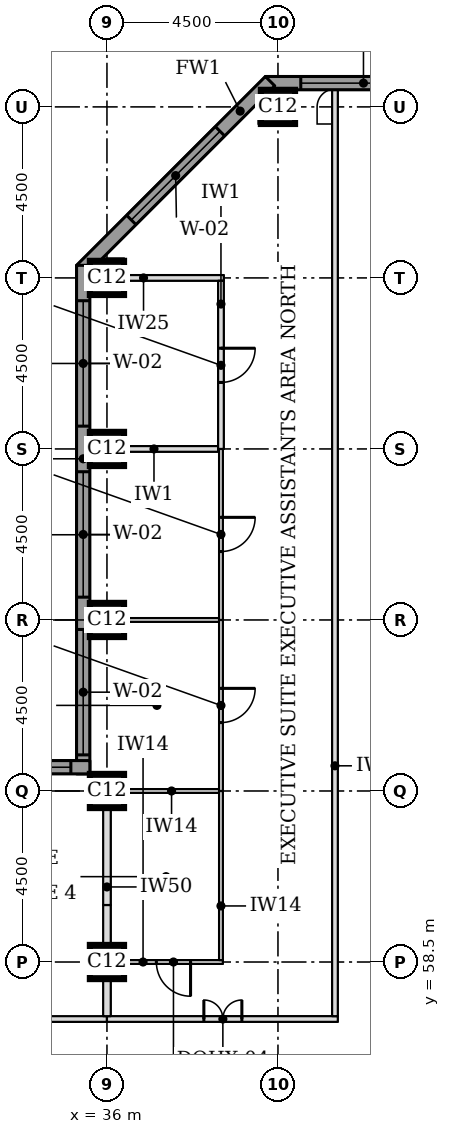
"""IFC4 building model, lengths in metres.
Left out: names, types, materials, properties, quantities, classifications, styles, units other than length and angle.
Written with IfcOpenShell. Run it as: python <this file> out.ifc"""

import sys

from ifc_helpers import new_model, si_unit, direction, frame, frame_2d, origin, origin_2d, place, context, subcontext, project, spatial, rectangle, extrude, element, fill, save


model = new_model("IFC4")
c1 = context("Model", 3, precision=1e-05, world=origin(), true_north=direction((0.0, 1.0)))
c2 = subcontext(c1, "Body", "Model", "MODEL_VIEW")
j1 = project(units=[si_unit("LENGTHUNIT", "METRE"), si_unit("PLANEANGLEUNIT", "RADIAN")], contexts=[c1])
p1 = place(None, origin())
s1 = spatial("IfcSite", under=j1, at=p1, CompositionType="ELEMENT")
p2 = place(p1, origin())
s2 = spatial("IfcBuilding", under=s1, at=p2, CompositionType="ELEMENT")
p3 = place(p2, frame((0.0, 0.0, 256.3)))
s3 = spatial("IfcBuildingStorey", under=s2, at=p3, CompositionType="ELEMENT", Elevation=256.3)
for number, where, z_axis, x_axis in (
    (1, (36.0, 58.5, 0.0), (0.0, 0.0, 1.0), (1.0, 0.0, 0.0)),
    (2, (36.0, 63.0, 0.0), (0.0, 0.0, 1.0), (1.0, 0.0, 0.0)),
    (3, (36.0, 67.5, 0.0), (0.0, 0.0, 1.0), (1.0, 0.0, 0.0)),
    (4, (36.0, 72.0, 0.0), (0.0, 0.0, 1.0), (1.0, 0.0, 0.0)),
    (5, (36.0, 76.5, 0.0), (0.0, 0.0, 1.0), (1.0, 0.0, 0.0)),
    (6, (40.5, 81.0, 0.0), (0.0, 0.0, 1.0), (1.0, 0.0, 0.0)),
):
    element("IfcColumn", number, at=place(p3, frame(where, z_axis=z_axis, x_axis=x_axis)), inside=s3, PredefinedType="COLUMN", context=c2, shape_type="SweptSolid", body=[
        extrude(rectangle(XDim=0.9, YDim=0.9, at=origin_2d()), origin(), (0.0, 0.0, 1.0), 3.7),
    ])
p4 = place(p3, frame((72.331, 81.625, 0.0), z_axis=(0.0, 0.0, 1.0), x_axis=(-1.0, 0.0, 0.0)))
e7 = element("IfcWall", 7, at=p4, inside=s3, PredefinedType="STANDARD", context=c2, shape_type="SweptSolid", body=[
    extrude(rectangle(XDim=32.163, YDim=0.35, at=frame_2d((16.081, 0.0))), origin(), (0.0, 0.0, 1.0), 3.525),
])
p5 = place(p4, frame((0.931, 0.0, 0.9)))
e8 = element("IfcOpeningElement", 8, at=p5, cuts=e7, PredefinedType="OPENING", context=c2, shape_type="SweptSolid", body=[
    extrude(rectangle(XDim=3.3, YDim=1.9, at=frame_2d((1.65, 0.95))), frame((0.0, 0.185, 0.0), z_axis=(0.0, -1.0, 0.0), x_axis=(1.0, 0.0, 0.0)), (0.0, 0.0, 1.0), 0.37),
])
p6 = place(p4, frame((5.431, 0.0, 0.9)))
e9 = element("IfcOpeningElement", 9, at=p6, cuts=e7, PredefinedType="OPENING", context=c2, shape_type="SweptSolid", body=[
    extrude(rectangle(XDim=3.3, YDim=1.9, at=frame_2d((1.65, 0.95))), frame((0.0, 0.185, 0.0), z_axis=(0.0, -1.0, 0.0), x_axis=(1.0, 0.0, 0.0)), (0.0, 0.0, 1.0), 0.37),
])
p7 = place(p4, frame((9.931, 0.0, 0.9)))
e10 = element("IfcOpeningElement", 10, at=p7, cuts=e7, PredefinedType="OPENING", context=c2, shape_type="SweptSolid", body=[
    extrude(rectangle(XDim=3.3, YDim=1.9, at=frame_2d((1.65, 0.95))), frame((0.0, 0.185, 0.0), z_axis=(0.0, -1.0, 0.0), x_axis=(1.0, 0.0, 0.0)), (0.0, 0.0, 1.0), 0.37),
])
p8 = place(p4, frame((14.431, 0.0, 0.9)))
e11 = element("IfcOpeningElement", 11, at=p8, cuts=e7, PredefinedType="OPENING", context=c2, shape_type="SweptSolid", body=[
    extrude(rectangle(XDim=3.3, YDim=1.9, at=frame_2d((1.65, 0.95))), frame((0.0, 0.185, 0.0), z_axis=(0.0, -1.0, 0.0), x_axis=(1.0, 0.0, 0.0)), (0.0, 0.0, 1.0), 0.37),
])
p9 = place(p4, frame((18.931, 0.0, 0.9)))
e12 = element("IfcOpeningElement", 12, at=p9, cuts=e7, PredefinedType="OPENING", context=c2, shape_type="SweptSolid", body=[
    extrude(rectangle(XDim=3.3, YDim=1.9, at=frame_2d((1.65, 0.95))), frame((0.0, 0.185, 0.0), z_axis=(0.0, -1.0, 0.0), x_axis=(1.0, 0.0, 0.0)), (0.0, 0.0, 1.0), 0.37),
])
p10 = place(p4, frame((23.431, 0.0, 0.9)))
e13 = element("IfcOpeningElement", 13, at=p10, cuts=e7, PredefinedType="OPENING", context=c2, shape_type="SweptSolid", body=[
    extrude(rectangle(XDim=3.3, YDim=1.9, at=frame_2d((1.65, 0.95))), frame((0.0, 0.185, 0.0), z_axis=(0.0, -1.0, 0.0), x_axis=(1.0, 0.0, 0.0)), (0.0, 0.0, 1.0), 0.37),
])
p11 = place(p4, frame((27.931, 0.0, 0.9)))
e14 = element("IfcOpeningElement", 14, at=p11, cuts=e7, PredefinedType="OPENING", context=c2, shape_type="SweptSolid", body=[
    extrude(rectangle(XDim=3.3, YDim=1.9, at=frame_2d((1.65, 0.95))), frame((0.0, 0.185, 0.0), z_axis=(0.0, -1.0, 0.0), x_axis=(1.0, 0.0, 0.0)), (0.0, 0.0, 1.0), 0.37),
])
p12 = place(p3, frame((40.292, 81.676, 0.0), z_axis=(0.0, 0.0, 1.0), x_axis=(-0.707106781187, -0.707106781187, 0.0)))
e15 = element("IfcWall", 15, at=p12, inside=s3, PredefinedType="STANDARD", context=c2, shape_type="SweptSolid", body=[
    extrude(rectangle(XDim=7.027, YDim=0.35, at=frame_2d((3.513, 0.0))), origin(), (0.0, 0.0, 1.0), 3.525),
])
p13 = place(p12, frame((1.863, 0.0, 0.9)))
e16 = element("IfcOpeningElement", 16, at=p13, cuts=e15, PredefinedType="OPENING", context=c2, shape_type="SweptSolid", body=[
    extrude(rectangle(XDim=3.3, YDim=1.9, at=frame_2d((1.65, 0.95))), frame((0.0, 0.185, 0.0), z_axis=(0.0, -1.0, 0.0), x_axis=(1.0, 0.0, 0.0)), (0.0, 0.0, 1.0), 0.37),
])
p14 = place(p3, frame((35.375, 76.831, 0.0), z_axis=(0.0, 0.0, 1.0), x_axis=(0.0, -1.0, 0.0)))
e17 = element("IfcWall", 17, at=p14, inside=s3, PredefinedType="STANDARD", context=c2, shape_type="SweptSolid", body=[
    extrude(rectangle(XDim=13.381, YDim=0.35, at=frame_2d((6.691, 0.0))), origin(), (0.0, 0.0, 1.0), 3.525),
])
p15 = place(p14, frame((0.931, 0.0, 0.9)))
e18 = element("IfcOpeningElement", 18, at=p15, cuts=e17, PredefinedType="OPENING", context=c2, shape_type="SweptSolid", body=[
    extrude(rectangle(XDim=3.3, YDim=1.9, at=frame_2d((1.65, 0.95))), frame((0.0, 0.185, 0.0), z_axis=(0.0, -1.0, 0.0), x_axis=(1.0, 0.0, 0.0)), (0.0, 0.0, 1.0), 0.37),
])
p16 = place(p14, frame((5.431, 0.0, 0.9)))
e19 = element("IfcOpeningElement", 19, at=p16, cuts=e17, PredefinedType="OPENING", context=c2, shape_type="SweptSolid", body=[
    extrude(rectangle(XDim=3.3, YDim=1.9, at=frame_2d((1.65, 0.95))), frame((0.0, 0.185, 0.0), z_axis=(0.0, -1.0, 0.0), x_axis=(1.0, 0.0, 0.0)), (0.0, 0.0, 1.0), 0.37),
])
p17 = place(p14, frame((9.581, 0.0, 0.9)))
e20 = element("IfcOpeningElement", 20, at=p17, cuts=e17, PredefinedType="OPENING", context=c2, shape_type="SweptSolid", body=[
    extrude(rectangle(XDim=3.3, YDim=1.9, at=frame_2d((1.65, 0.95))), frame((0.0, 0.185, 0.0), z_axis=(0.0, -1.0, 0.0), x_axis=(1.0, 0.0, 0.0)), (0.0, 0.0, 1.0), 0.37),
])
p18 = place(p3, frame((35.55, 63.625, 0.0), z_axis=(0.0, 0.0, 1.0), x_axis=(-1.0, 0.0, 0.0)))
e21 = element("IfcWall", 21, at=p18, inside=s3, PredefinedType="STANDARD", context=c2, shape_type="SweptSolid", body=[
    extrude(rectangle(XDim=17.881, YDim=0.35, at=frame_2d((8.941, 0.0))), origin(), (0.0, 0.0, 1.0), 3.525),
])
p19 = place(p18, frame((0.5, 0.0, 0.9)))
e22 = element("IfcOpeningElement", 22, at=p19, cuts=e21, PredefinedType="OPENING", context=c2, shape_type="SweptSolid", body=[
    extrude(rectangle(XDim=3.3, YDim=1.9, at=frame_2d((1.65, 0.95))), frame((0.0, 0.185, 0.0), z_axis=(0.0, -1.0, 0.0), x_axis=(1.0, 0.0, 0.0)), (0.0, 0.0, 1.0), 0.37),
])
p20 = place(p18, frame((4.65, 0.0, 0.9)))
e23 = element("IfcOpeningElement", 23, at=p20, cuts=e21, PredefinedType="OPENING", context=c2, shape_type="SweptSolid", body=[
    extrude(rectangle(XDim=3.3, YDim=1.9, at=frame_2d((1.65, 0.95))), frame((0.0, 0.185, 0.0), z_axis=(0.0, -1.0, 0.0), x_axis=(1.0, 0.0, 0.0)), (0.0, 0.0, 1.0), 0.37),
])
p21 = place(p18, frame((9.15, 0.0, 0.9)))
e24 = element("IfcOpeningElement", 24, at=p21, cuts=e21, PredefinedType="OPENING", context=c2, shape_type="SweptSolid", body=[
    extrude(rectangle(XDim=3.3, YDim=1.9, at=frame_2d((1.65, 0.95))), frame((0.0, 0.185, 0.0), z_axis=(0.0, -1.0, 0.0), x_axis=(1.0, 0.0, 0.0)), (0.0, 0.0, 1.0), 0.37),
])
p22 = place(p18, frame((13.65, 0.0, 0.9)))
e25 = element("IfcOpeningElement", 25, at=p22, cuts=e21, PredefinedType="OPENING", context=c2, shape_type="SweptSolid", body=[
    extrude(rectangle(XDim=3.3, YDim=1.9, at=frame_2d((1.65, 0.95))), frame((0.0, 0.185, 0.0), z_axis=(0.0, -1.0, 0.0), x_axis=(1.0, 0.0, 0.0)), (0.0, 0.0, 1.0), 0.37),
])
p23 = place(p3, frame((29.38, 57.0, 0.0), z_axis=(0.0, 0.0, 1.0), x_axis=(1.0, 0.0, 0.0)))
e26 = element("IfcWall", 26, at=p23, inside=s3, PredefinedType="PARTITIONING", context=c2, shape_type="SweptSolid", body=[
    extrude(rectangle(XDim=6.62, YDim=0.15, at=frame_2d((3.31, 0.0))), origin(), (0.0, 0.0, 1.0), 3.55),
])
p24 = place(p23, frame((2.88, 0.0, 0.0)))
e27 = element("IfcOpeningElement", 27, at=p24, cuts=e26, PredefinedType="OPENING", context=c2, shape_type="SweptSolid", body=[
    extrude(rectangle(XDim=1.0, YDim=2.1, at=frame_2d((0.5, 1.05))), frame((0.0, 0.085, 0.0), z_axis=(0.0, -1.0, 0.0), x_axis=(1.0, 0.0, 0.0)), (0.0, 0.0, 1.0), 0.17),
])
p25 = place(p3, frame((36.0, 57.0, 0.0), z_axis=(0.0, 0.0, 1.0), x_axis=(1.0, 0.0, 0.0)))
e28 = element("IfcWall", 28, at=p25, inside=s3, PredefinedType="PARTITIONING", context=c2, shape_type="SweptSolid", body=[
    extrude(rectangle(XDim=6.075, YDim=0.15, at=frame_2d((3.038, 0.0))), origin(), (0.0, 0.0, 1.0), 3.55),
])
p26 = place(p25, frame((2.55, 0.0, 0.0)))
e29 = element("IfcOpeningElement", 29, at=p26, cuts=e28, PredefinedType="OPENING", context=c2, shape_type="SweptSolid", body=[
    extrude(rectangle(XDim=1.0, YDim=2.1, at=frame_2d((0.5, 1.05))), frame((0.0, 0.085, 0.0), z_axis=(0.0, -1.0, 0.0), x_axis=(1.0, 0.0, 0.0)), (0.0, 0.0, 1.0), 0.17),
])
p27 = place(p3, frame((36.45, 58.5, 0.0), z_axis=(0.0, 0.0, 1.0), x_axis=(1.0, 0.0, 0.0)))
e30 = element("IfcWall", 30, at=p27, inside=s3, PredefinedType="PARTITIONING", context=c2, shape_type="SweptSolid", body=[
    extrude(rectangle(XDim=2.6, YDim=0.1, at=frame_2d((1.3, 0.0))), origin(), (0.0, 0.0, 1.0), 3.55),
])
p28 = place(p27, frame((0.85, 0.0, 0.0)))
e31 = element("IfcOpeningElement", 31, at=p28, cuts=e30, PredefinedType="OPENING", context=c2, shape_type="SweptSolid", body=[
    extrude(rectangle(XDim=0.9, YDim=2.1, at=frame_2d((0.45, 1.05))), frame((0.0, 0.06, 0.0), z_axis=(0.0, -1.0, 0.0), x_axis=(1.0, 0.0, 0.0)), (0.0, 0.0, 1.0), 0.12),
])
p29 = place(p3, frame((36.45, 63.0, 0.0), z_axis=(0.0, 0.0, 1.0), x_axis=(1.0, 0.0, 0.0)))
e32 = element("IfcWall", 32, at=p29, inside=s3, PredefinedType="PARTITIONING", context=c2, shape_type="SweptSolid", body=[
    extrude(rectangle(XDim=2.5, YDim=0.1, at=frame_2d((1.25, 0.0))), origin(), (0.0, 0.0, 1.0), 3.55),
])
p30 = place(p3, frame((35.55, 67.5, 0.0), z_axis=(0.0, 0.0, 1.0), x_axis=(1.0, 0.0, 0.0)))
e33 = element("IfcWall", 33, at=p30, inside=s3, PredefinedType="PARTITIONING", context=c2, shape_type="SweptSolid", body=[
    extrude(rectangle(XDim=3.4, YDim=0.1, at=frame_2d((1.7, 0.0))), origin(), (0.0, 0.0, 1.0), 3.55),
])
p31 = place(p3, frame((35.55, 72.0, 0.0), z_axis=(0.0, 0.0, 1.0), x_axis=(1.0, 0.0, 0.0)))
e34 = element("IfcWall", 34, at=p31, inside=s3, PredefinedType="PARTITIONING", context=c2, shape_type="SweptSolid", body=[
    extrude(rectangle(XDim=3.375, YDim=0.15, at=frame_2d((1.688, 0.0))), origin(), (0.0, 0.0, 1.0), 3.55),
])
p32 = place(p3, frame((36.45, 76.5, 0.0), z_axis=(0.0, 0.0, 1.0), x_axis=(1.0, 0.0, 0.0)))
e35 = element("IfcWall", 35, at=p32, inside=s3, PredefinedType="PARTITIONING", context=c2, shape_type="SweptSolid", body=[
    extrude(rectangle(XDim=2.625, YDim=0.15, at=frame_2d((1.312, 0.0))), origin(), (0.0, 0.0, 1.0), 3.096),
])
p33 = place(p3, frame((36.0, 57.075, 0.0), z_axis=(0.0, 0.0, 1.0), x_axis=(0.0, 1.0, 0.0)))
e36 = element("IfcWall", 36, at=p33, inside=s3, PredefinedType="PARTITIONING", context=c2, shape_type="SweptSolid", body=[
    extrude(rectangle(XDim=0.975, YDim=0.2, at=frame_2d((0.488, 0.0))), origin(), (0.0, 0.0, 1.0), 2.8),
])
p34 = place(p3, frame((42.0, 57.075, 0.0), z_axis=(0.0, 0.0, 1.0), x_axis=(0.0, 1.0, 0.0)))
e37 = element("IfcWall", 37, at=p34, inside=s3, PredefinedType="PARTITIONING", context=c2, shape_type="SweptSolid", body=[
    extrude(rectangle(XDim=24.375, YDim=0.15, at=frame_2d((12.188, 0.0))), origin(), (0.0, 0.0, 1.0), 3.55),
])
p35 = place(p3, frame((39.0, 58.55, 0.0), z_axis=(0.0, 0.0, 1.0), x_axis=(0.0, 1.0, 0.0)))
e38 = element("IfcWall", 38, at=p35, inside=s3, PredefinedType="PARTITIONING", context=c2, shape_type="SweptSolid", body=[
    extrude(rectangle(XDim=4.45, YDim=0.1, at=frame_2d((2.225, 0.0))), origin(), (0.0, 0.0, 1.0), 3.55),
])
p36 = place(p3, frame((36.0, 58.92, 0.0), z_axis=(0.0, 0.0, 1.0), x_axis=(0.0, 1.0, 0.0)))
e39 = element("IfcWall", 39, at=p36, inside=s3, PredefinedType="PARTITIONING", context=c2, shape_type="SweptSolid", body=[
    extrude(rectangle(XDim=1.08, YDim=0.2, at=frame_2d((0.54, 0.0))), origin(), (0.0, 0.0, 1.0), 2.8),
])
p37 = place(p3, frame((36.0, 60.0, 0.0), z_axis=(0.0, 0.0, 1.0), x_axis=(0.0, 1.0, 0.0)))
e40 = element("IfcWall", 40, at=p37, inside=s3, PredefinedType="PARTITIONING", context=c2, shape_type="SweptSolid", body=[
    extrude(rectangle(XDim=2.55, YDim=0.2, at=frame_2d((1.275, 0.0))), origin(), (0.0, 0.0, 1.0), 2.8),
])
p38 = place(p3, frame((39.0, 63.0, 0.0), z_axis=(0.0, 0.0, 1.0), x_axis=(0.0, 1.0, 0.0)))
e41 = element("IfcWall", 41, at=p38, inside=s3, PredefinedType="PARTITIONING", context=c2, shape_type="SweptSolid", body=[
    extrude(rectangle(XDim=4.5, YDim=0.1, at=frame_2d((2.25, 0.0))), origin(), (0.0, 0.0, 1.0), 3.55),
])
p39 = place(p38, frame((1.8, 0.0, 0.0)))
e42 = element("IfcOpeningElement", 42, at=p39, cuts=e41, PredefinedType="OPENING", context=c2, shape_type="SweptSolid", body=[
    extrude(rectangle(XDim=0.9, YDim=2.1, at=frame_2d((0.45, 1.05))), frame((0.0, 0.06, 0.0), z_axis=(0.0, -1.0, 0.0), x_axis=(1.0, 0.0, 0.0)), (0.0, 0.0, 1.0), 0.12),
])
p40 = place(p3, frame((39.0, 67.5, 0.0), z_axis=(0.0, 0.0, 1.0), x_axis=(0.0, 1.0, 0.0)))
e43 = element("IfcWall", 43, at=p40, inside=s3, PredefinedType="PARTITIONING", context=c2, shape_type="SweptSolid", body=[
    extrude(rectangle(XDim=4.5, YDim=0.1, at=frame_2d((2.25, 0.0))), origin(), (0.0, 0.0, 1.0), 3.55),
])
p41 = place(p40, frame((1.8, 0.0, 0.0)))
e44 = element("IfcOpeningElement", 44, at=p41, cuts=e43, PredefinedType="OPENING", context=c2, shape_type="SweptSolid", body=[
    extrude(rectangle(XDim=0.9, YDim=2.1, at=frame_2d((0.45, 1.05))), frame((0.0, 0.06, 0.0), z_axis=(0.0, -1.0, 0.0), x_axis=(1.0, 0.0, 0.0)), (0.0, 0.0, 1.0), 0.12),
])
p42 = place(p3, frame((39.0, 72.0, 0.0), z_axis=(0.0, 0.0, 1.0), x_axis=(0.0, 1.0, 0.0)))
e45 = element("IfcWall", 45, at=p42, inside=s3, PredefinedType="PARTITIONING", context=c2, shape_type="SweptSolid", body=[
    extrude(rectangle(XDim=4.425, YDim=0.15, at=frame_2d((2.212, 0.0))), origin(), (0.0, 0.0, 1.0), 3.55),
])
p43 = place(p42, frame((1.75, 0.0, 0.0)))
e46 = element("IfcOpeningElement", 46, at=p43, cuts=e45, PredefinedType="OPENING", context=c2, shape_type="SweptSolid", body=[
    extrude(rectangle(XDim=0.9, YDim=2.1, at=frame_2d((0.45, 1.05))), frame((0.0, 0.085, 0.0), z_axis=(0.0, -1.0, 0.0), x_axis=(1.0, 0.0, 0.0)), (0.0, 0.0, 1.0), 0.17),
])
p44 = place(p11, origin())
e47 = element("IfcWindow", 47, at=p44, inside=s3, PartitioningType="SINGLE_PANEL", PredefinedType="WINDOW", context=c2, shape_type="SweptSolid", body=[
    extrude(rectangle(XDim=3.3, YDim=1.9, at=frame_2d((1.65, 0.95))), frame((0.0, 0.085, 0.0), z_axis=(0.0, -1.0, 0.0), x_axis=(1.0, 0.0, 0.0)), (0.0, 0.0, 1.0), 0.06),
])
fill(e14, e47)
p45 = place(p13, origin())
e48 = element("IfcWindow", 48, at=p45, inside=s3, PartitioningType="SINGLE_PANEL", PredefinedType="WINDOW", context=c2, shape_type="SweptSolid", body=[
    extrude(rectangle(XDim=3.3, YDim=1.9, at=frame_2d((1.65, 0.95))), frame((0.0, 0.085, 0.0), z_axis=(0.0, -1.0, 0.0), x_axis=(1.0, 0.0, 0.0)), (0.0, 0.0, 1.0), 0.06),
])
fill(e16, e48)
p46 = place(p15, origin())
e49 = element("IfcWindow", 49, at=p46, inside=s3, PartitioningType="SINGLE_PANEL", PredefinedType="WINDOW", context=c2, shape_type="SweptSolid", body=[
    extrude(rectangle(XDim=3.3, YDim=1.9, at=frame_2d((1.65, 0.95))), frame((0.0, 0.085, 0.0), z_axis=(0.0, -1.0, 0.0), x_axis=(1.0, 0.0, 0.0)), (0.0, 0.0, 1.0), 0.06),
])
fill(e18, e49)
p47 = place(p16, origin())
e50 = element("IfcWindow", 50, at=p47, inside=s3, PartitioningType="SINGLE_PANEL", PredefinedType="WINDOW", context=c2, shape_type="SweptSolid", body=[
    extrude(rectangle(XDim=3.3, YDim=1.9, at=frame_2d((1.65, 0.95))), frame((0.0, 0.085, 0.0), z_axis=(0.0, -1.0, 0.0), x_axis=(1.0, 0.0, 0.0)), (0.0, 0.0, 1.0), 0.06),
])
fill(e19, e50)
p48 = place(p17, origin())
e51 = element("IfcWindow", 51, at=p48, inside=s3, PartitioningType="SINGLE_PANEL", PredefinedType="WINDOW", context=c2, shape_type="SweptSolid", body=[
    extrude(rectangle(XDim=3.3, YDim=1.9, at=frame_2d((1.65, 0.95))), frame((0.0, 0.085, 0.0), z_axis=(0.0, -1.0, 0.0), x_axis=(1.0, 0.0, 0.0)), (0.0, 0.0, 1.0), 0.06),
])
fill(e20, e51)
p49 = place(p19, origin())
e52 = element("IfcWindow", 52, at=p49, inside=s3, PartitioningType="SINGLE_PANEL", PredefinedType="WINDOW", context=c2, shape_type="SweptSolid", body=[
    extrude(rectangle(XDim=3.3, YDim=1.9, at=frame_2d((1.65, 0.95))), frame((0.0, 0.085, 0.0), z_axis=(0.0, -1.0, 0.0), x_axis=(1.0, 0.0, 0.0)), (0.0, 0.0, 1.0), 0.06),
])
fill(e22, e52)
p50 = place(p26, origin())
e53 = element("IfcDoor", 53, at=p50, inside=s3, OperationType="DOUBLE_DOOR_SINGLE_SWING", PredefinedType="DOOR", context=c2, shape_type="SweptSolid", body=[
    extrude(rectangle(XDim=1.0, YDim=2.1, at=frame_2d((0.5, 1.05))), frame((0.0, 0.025, 0.0), z_axis=(0.0, -1.0, 0.0), x_axis=(1.0, 0.0, 0.0)), (0.0, 0.0, 1.0), 0.05),
])
fill(e29, e53)
p51 = place(p28, frame((0.9, 0.0, 0.0), z_axis=(0.0, 0.0, 1.0), x_axis=(-1.0, 0.0, 0.0)))
e54 = element("IfcDoor", 54, at=p51, inside=s3, OperationType="SINGLE_SWING_LEFT", PredefinedType="DOOR", context=c2, shape_type="SweptSolid", body=[
    extrude(rectangle(XDim=0.9, YDim=2.1, at=frame_2d((0.45, 1.05))), frame((0.0, 0.025, 0.0), z_axis=(0.0, -1.0, 0.0), x_axis=(1.0, 0.0, 0.0)), (0.0, 0.0, 1.0), 0.05),
])
fill(e31, e54)
p52 = place(p39, frame((0.9, 0.0, 0.0), z_axis=(0.0, 0.0, 1.0), x_axis=(-1.0, 0.0, 0.0)))
e55 = element("IfcDoor", 55, at=p52, inside=s3, OperationType="SINGLE_SWING_LEFT", PredefinedType="DOOR", context=c2, shape_type="SweptSolid", body=[
    extrude(rectangle(XDim=0.9, YDim=2.1, at=frame_2d((0.45, 1.05))), frame((0.0, 0.025, 0.0), z_axis=(0.0, -1.0, 0.0), x_axis=(1.0, 0.0, 0.0)), (0.0, 0.0, 1.0), 0.05),
])
fill(e42, e55)
p53 = place(p41, frame((0.9, 0.0, 0.0), z_axis=(0.0, 0.0, 1.0), x_axis=(-1.0, 0.0, 0.0)))
e56 = element("IfcDoor", 56, at=p53, inside=s3, OperationType="SINGLE_SWING_LEFT", PredefinedType="DOOR", context=c2, shape_type="SweptSolid", body=[
    extrude(rectangle(XDim=0.9, YDim=2.1, at=frame_2d((0.45, 1.05))), frame((0.0, 0.025, 0.0), z_axis=(0.0, -1.0, 0.0), x_axis=(1.0, 0.0, 0.0)), (0.0, 0.0, 1.0), 0.05),
])
fill(e44, e56)
p54 = place(p43, frame((0.9, 0.0, 0.0), z_axis=(0.0, 0.0, 1.0), x_axis=(-1.0, 0.0, 0.0)))
e57 = element("IfcDoor", 57, at=p54, inside=s3, OperationType="SINGLE_SWING_LEFT", PredefinedType="DOOR", context=c2, shape_type="SweptSolid", body=[
    extrude(rectangle(XDim=0.9, YDim=2.1, at=frame_2d((0.45, 1.05))), frame((0.0, 0.025, 0.0), z_axis=(0.0, -1.0, 0.0), x_axis=(1.0, 0.0, 0.0)), (0.0, 0.0, 1.0), 0.05),
])
fill(e46, e57)
save(model, sys.argv[1])
